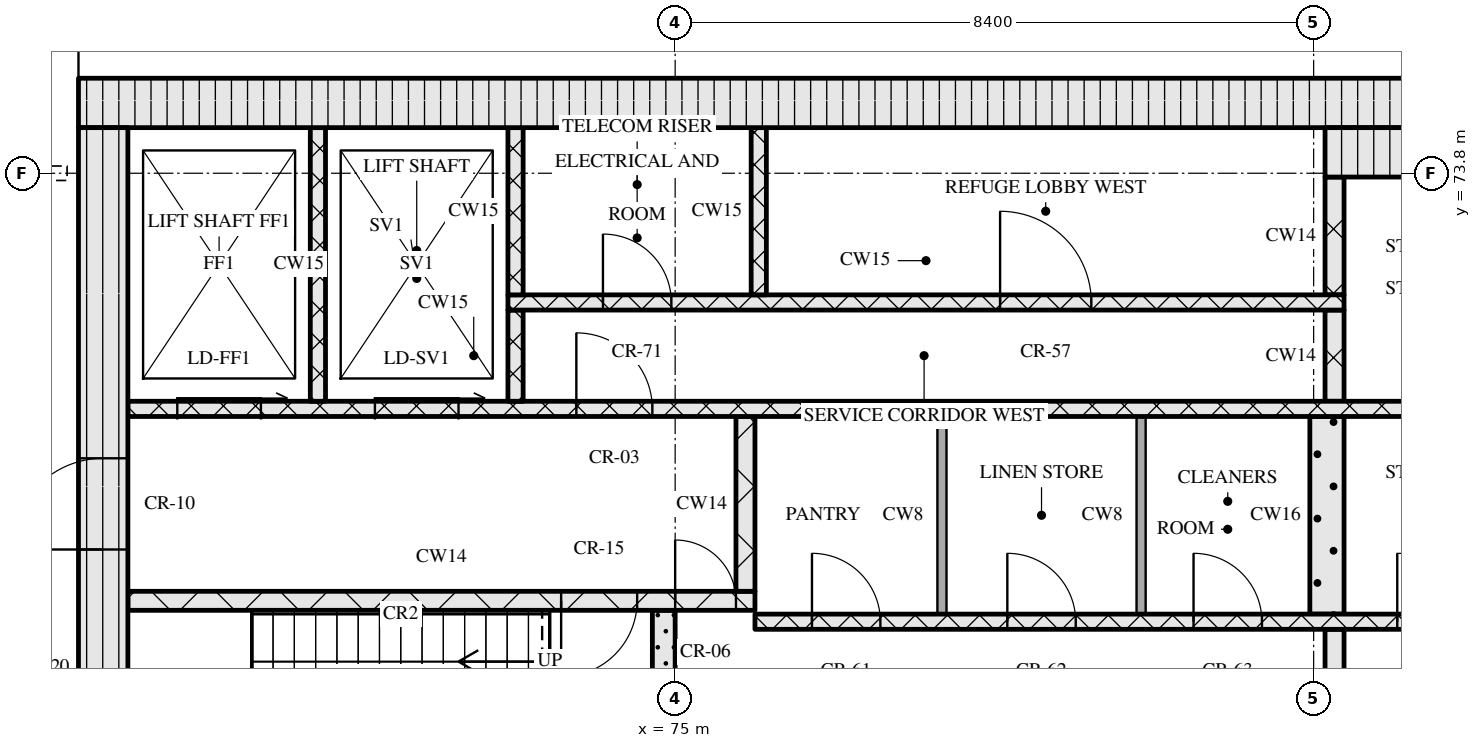
"""IFC4 building model, lengths in metres.
Left out: names, types, materials, properties, quantities, classifications, styles, units other than length and angle.
Written with IfcOpenShell. Run it as: python <this file> out.ifc"""

import sys

from ifc_helpers import new_model, si_unit, direction, frame, frame_2d, origin, place, context, subcontext, project, spatial, rectangle, extrude, element, fill, save


model = new_model("IFC4")
c1 = context("Model", 3, precision=1e-05, world=origin(), true_north=direction((0.0, 1.0)))
c2 = subcontext(c1, "Body", "Model", "MODEL_VIEW")
j1 = project(units=[si_unit("LENGTHUNIT", "METRE"), si_unit("PLANEANGLEUNIT", "RADIAN")], contexts=[c1])
p1 = place(None, origin())
s1 = spatial("IfcSite", under=j1, at=p1, CompositionType="ELEMENT")
p2 = place(p1, origin())
s2 = spatial("IfcBuilding", under=s1, at=p2, CompositionType="ELEMENT")
p3 = place(p2, frame((0.0, 0.0, 194.25)))
s3 = spatial("IfcBuildingStorey", under=s2, at=p3, CompositionType="ELEMENT", Elevation=194.25)
p4 = place(p3, frame((67.15, 74.725, 0.0), z_axis=(0.0, 0.0, 1.0), x_axis=(1.0, 0.0, 0.0)))
e1 = element("IfcWall", 1, at=p4, inside=s3, PredefinedType="SOLIDWALL", context=c2, shape_type="SweptSolid", body=[
    extrude(rectangle(XDim=40.9, YDim=0.65, at=frame_2d((20.45, 0.0))), origin(), (0.0, 0.0, 1.0), 10.97),
])
p5 = place(p3, frame((67.475, 62.4, 0.0), z_axis=(0.0, 0.0, 1.0), x_axis=(0.0, 1.0, 0.0)))
e2 = element("IfcWall", 2, at=p5, inside=s3, PredefinedType="SOLIDWALL", context=c2, shape_type="SweptSolid", body=[
    extrude(rectangle(XDim=12.0, YDim=0.65, at=frame_2d((6.0, 0.0))), origin(), (0.0, 0.0, 1.0), 10.97),
])
p6 = place(p5, frame((6.45, 0.0, 0.0)))
e3 = element("IfcOpeningElement", 3, at=p6, cuts=e2, PredefinedType="OPENING", context=c2, shape_type="SweptSolid", body=[
    extrude(rectangle(XDim=1.2, YDim=2.1, at=frame_2d((0.6, 1.05))), frame((0.0, 0.335, 0.0), z_axis=(0.0, -1.0, 0.0), x_axis=(1.0, 0.0, 0.0)), (0.0, 0.0, 1.0), 0.67),
])
p7 = place(p3, frame((74.85, 65.2, 0.0), z_axis=(0.0, 0.0, 1.0), x_axis=(0.0, 1.0, 0.0)))
e4 = element("IfcWall", 4, at=p7, inside=s3, PredefinedType="SOLIDWALL", context=c2, shape_type="SweptSolid", body=[
    extrude(rectangle(XDim=2.85, YDim=0.3, at=frame_2d((1.425, 0.0))), origin(), (0.0, 0.0, 1.0), 10.97),
])
p8 = place(p3, frame((83.675, 65.2, 0.0), z_axis=(0.0, 0.0, 1.0), x_axis=(0.0, 1.0, 0.0)))
e5 = element("IfcWall", 5, at=p8, inside=s3, PredefinedType="SOLIDWALL", context=c2, shape_type="SweptSolid", body=[
    extrude(rectangle(XDim=2.6, YDim=0.25, at=frame_2d((1.3, 0.0))), origin(), (0.0, 0.0, 1.0), 10.97),
])
p9 = place(p8, frame((0.7, 0.0, 0.0)))
e6 = element("IfcOpeningElement", 6, at=p9, cuts=e5, PredefinedType="OPENING", context=c2, shape_type="SweptSolid", body=[
    extrude(rectangle(XDim=1.2, YDim=2.1, at=frame_2d((0.6, 1.05))), frame((0.0, 0.135, 0.0), z_axis=(0.0, -1.0, 0.0), x_axis=(1.0, 0.0, 0.0)), (0.0, 0.0, 1.0), 0.27),
])
p10 = place(p3, frame((76.05, 67.9, 0.0), z_axis=(0.0, 0.0, 1.0), x_axis=(1.0, 0.0, 0.0)))
e7 = element("IfcWall", 7, at=p10, inside=s3, PredefinedType="SOLIDWALL", context=c2, shape_type="SweptSolid", body=[
    extrude(rectangle(XDim=23.1, YDim=0.2, at=frame_2d((11.55, 0.0))), origin(), (0.0, 0.0, 1.0), 10.97),
])
p11 = place(p10, frame((0.75, 0.0, 0.0)))
e8 = element("IfcOpeningElement", 8, at=p11, cuts=e7, PredefinedType="OPENING", context=c2, shape_type="SweptSolid", body=[
    extrude(rectangle(XDim=0.9, YDim=2.1, at=frame_2d((0.45, 1.05))), frame((0.0, 0.11, 0.0), z_axis=(0.0, -1.0, 0.0), x_axis=(1.0, 0.0, 0.0)), (0.0, 0.0, 1.0), 0.22),
])
p12 = place(p10, frame((3.32, 0.0, 0.0)))
e9 = element("IfcOpeningElement", 9, at=p12, cuts=e7, PredefinedType="OPENING", context=c2, shape_type="SweptSolid", body=[
    extrude(rectangle(XDim=0.9, YDim=2.1, at=frame_2d((0.45, 1.05))), frame((0.0, 0.11, 0.0), z_axis=(0.0, -1.0, 0.0), x_axis=(1.0, 0.0, 0.0)), (0.0, 0.0, 1.0), 0.22),
])
p13 = place(p10, frame((5.77, 0.0, 0.0)))
e10 = element("IfcOpeningElement", 10, at=p13, cuts=e7, PredefinedType="OPENING", context=c2, shape_type="SweptSolid", body=[
    extrude(rectangle(XDim=0.9, YDim=2.1, at=frame_2d((0.45, 1.05))), frame((0.0, 0.11, 0.0), z_axis=(0.0, -1.0, 0.0), x_axis=(1.0, 0.0, 0.0)), (0.0, 0.0, 1.0), 0.22),
])
p14 = place(p10, frame((8.45, 0.0, 0.0)))
e11 = element("IfcOpeningElement", 11, at=p14, cuts=e7, PredefinedType="OPENING", context=c2, shape_type="SweptSolid", body=[
    extrude(rectangle(XDim=0.9, YDim=2.1, at=frame_2d((0.45, 1.05))), frame((0.0, 0.11, 0.0), z_axis=(0.0, -1.0, 0.0), x_axis=(1.0, 0.0, 0.0)), (0.0, 0.0, 1.0), 0.22),
])
p15 = place(p10, frame((10.91, 0.0, 0.0)))
e12 = element("IfcOpeningElement", 12, at=p15, cuts=e7, PredefinedType="OPENING", context=c2, shape_type="SweptSolid", body=[
    extrude(rectangle(XDim=0.9, YDim=2.1, at=frame_2d((0.45, 1.05))), frame((0.0, 0.11, 0.0), z_axis=(0.0, -1.0, 0.0), x_axis=(1.0, 0.0, 0.0)), (0.0, 0.0, 1.0), 0.22),
])
p16 = place(p10, frame((13.55, 0.0, 0.0)))
e13 = element("IfcOpeningElement", 13, at=p16, cuts=e7, PredefinedType="OPENING", context=c2, shape_type="SweptSolid", body=[
    extrude(rectangle(XDim=1.0, YDim=2.1, at=frame_2d((0.5, 1.05))), frame((0.0, 0.11, 0.0), z_axis=(0.0, -1.0, 0.0), x_axis=(1.0, 0.0, 0.0)), (0.0, 0.0, 1.0), 0.22),
])
p17 = place(p10, frame((16.2, 0.0, 0.0)))
e14 = element("IfcOpeningElement", 14, at=p17, cuts=e7, PredefinedType="OPENING", context=c2, shape_type="SweptSolid", body=[
    extrude(rectangle(XDim=1.1, YDim=2.1, at=frame_2d((0.55, 1.05))), frame((0.0, 0.11, 0.0), z_axis=(0.0, -1.0, 0.0), x_axis=(1.0, 0.0, 0.0)), (0.0, 0.0, 1.0), 0.22),
])
p18 = place(p10, frame((18.7, 0.0, 0.0)))
e15 = element("IfcOpeningElement", 15, at=p18, cuts=e7, PredefinedType="OPENING", context=c2, shape_type="SweptSolid", body=[
    extrude(rectangle(XDim=1.1, YDim=2.1, at=frame_2d((0.55, 1.05))), frame((0.0, 0.11, 0.0), z_axis=(0.0, -1.0, 0.0), x_axis=(1.0, 0.0, 0.0)), (0.0, 0.0, 1.0), 0.22),
])
p19 = place(p10, frame((21.2, 0.0, 0.0)))
e16 = element("IfcOpeningElement", 16, at=p19, cuts=e7, PredefinedType="OPENING", context=c2, shape_type="SweptSolid", body=[
    extrude(rectangle(XDim=1.1, YDim=2.1, at=frame_2d((0.55, 1.05))), frame((0.0, 0.11, 0.0), z_axis=(0.0, -1.0, 0.0), x_axis=(1.0, 0.0, 0.0)), (0.0, 0.0, 1.0), 0.22),
])
for number, where, z_axis, x_axis in (
    (17, (78.51, 68.0, 0.0), (0.0, 0.0, 1.0), (0.0, 1.0, 0.0)),
    (18, (81.13, 68.0, 0.0), (0.0, 0.0, 1.0), (0.0, 1.0, 0.0)),
):
    element("IfcWall", number, at=place(p3, frame(where, z_axis=z_axis, x_axis=x_axis)), inside=s3, PredefinedType="PARTITIONING", context=c2, shape_type="SweptSolid", body=[
        extrude(rectangle(XDim=2.6, YDim=0.12, at=frame_2d((1.3, 0.0))), origin(), (0.0, 0.0, 1.0), 10.97),
    ])
p20 = place(p3, frame((83.575, 68.0, 0.0), z_axis=(0.0, 0.0, 1.0), x_axis=(0.0, 1.0, 0.0)))
e19 = element("IfcWall", 19, at=p20, inside=s3, PredefinedType="SOLIDWALL", context=c2, shape_type="SweptSolid", body=[
    extrude(rectangle(XDim=2.6, YDim=0.45, at=frame_2d((1.3, 0.0))), origin(), (0.0, 0.0, 1.0), 10.97),
])
p21 = place(p3, frame((67.8, 68.175, 0.0), z_axis=(0.0, 0.0, 1.0), x_axis=(1.0, 0.0, 0.0)))
e20 = element("IfcWall", 20, at=p21, inside=s3, PredefinedType="SOLIDWALL", context=c2, shape_type="SweptSolid", body=[
    extrude(rectangle(XDim=8.25, YDim=0.25, at=frame_2d((4.125, 0.0))), origin(), (0.0, 0.0, 1.0), 10.97),
])
p22 = place(p21, frame((5.7, 0.0, 0.0)))
e21 = element("IfcOpeningElement", 21, at=p22, cuts=e20, PredefinedType="OPENING", context=c2, shape_type="SweptSolid", body=[
    extrude(rectangle(XDim=1.0, YDim=2.1, at=frame_2d((0.5, 1.05))), frame((0.0, 0.135, 0.0), z_axis=(0.0, -1.0, 0.0), x_axis=(1.0, 0.0, 0.0)), (0.0, 0.0, 1.0), 0.27),
])
p23 = place(p21, frame((7.2, 0.0, 0.0)))
e22 = element("IfcOpeningElement", 22, at=p23, cuts=e20, PredefinedType="OPENING", context=c2, shape_type="SweptSolid", body=[
    extrude(rectangle(XDim=0.8, YDim=2.1, at=frame_2d((0.4, 1.05))), frame((0.0, 0.135, 0.0), z_axis=(0.0, -1.0, 0.0), x_axis=(1.0, 0.0, 0.0)), (0.0, 0.0, 1.0), 0.27),
])
p24 = place(p3, frame((75.925, 68.3, 0.0), z_axis=(0.0, 0.0, 1.0), x_axis=(0.0, 1.0, 0.0)))
e23 = element("IfcWall", 23, at=p24, inside=s3, PredefinedType="SOLIDWALL", context=c2, shape_type="SweptSolid", body=[
    extrude(rectangle(XDim=2.3, YDim=0.25, at=frame_2d((1.15, 0.0))), origin(), (0.0, 0.0, 1.0), 10.97),
])
p25 = place(p3, frame((67.8, 70.7, 0.0), z_axis=(0.0, 0.0, 1.0), x_axis=(1.0, 0.0, 0.0)))
e24 = element("IfcWall", 24, at=p25, inside=s3, PredefinedType="SOLIDWALL", context=c2, shape_type="SweptSolid", body=[
    extrude(rectangle(XDim=39.6, YDim=0.2, at=frame_2d((19.8, 0.0))), origin(), (0.0, 0.0, 1.0), 10.97),
])
p26 = place(p25, frame((0.65, 0.0, 0.0)))
e25 = element("IfcOpeningElement", 25, at=p26, cuts=e24, PredefinedType="OPENING", context=c2, shape_type="SweptSolid", body=[
    extrude(rectangle(XDim=1.1, YDim=2.1, at=frame_2d((0.55, 1.05))), frame((0.0, 0.11, 0.0), z_axis=(0.0, -1.0, 0.0), x_axis=(1.0, 0.0, 0.0)), (0.0, 0.0, 1.0), 0.22),
])
p27 = place(p25, frame((3.25, 0.0, 0.0)))
e26 = element("IfcOpeningElement", 26, at=p27, cuts=e24, PredefinedType="OPENING", context=c2, shape_type="SweptSolid", body=[
    extrude(rectangle(XDim=1.1, YDim=2.1, at=frame_2d((0.55, 1.05))), frame((0.0, 0.11, 0.0), z_axis=(0.0, -1.0, 0.0), x_axis=(1.0, 0.0, 0.0)), (0.0, 0.0, 1.0), 0.22),
])
p28 = place(p25, frame((5.9, 0.0, 0.0)))
e27 = element("IfcOpeningElement", 27, at=p28, cuts=e24, PredefinedType="OPENING", context=c2, shape_type="SweptSolid", body=[
    extrude(rectangle(XDim=1.0, YDim=2.1, at=frame_2d((0.5, 1.05))), frame((0.0, 0.11, 0.0), z_axis=(0.0, -1.0, 0.0), x_axis=(1.0, 0.0, 0.0)), (0.0, 0.0, 1.0), 0.22),
])
p29 = place(p25, frame((21.7, 0.0, 0.0)))
e28 = element("IfcOpeningElement", 28, at=p29, cuts=e24, PredefinedType="OPENING", context=c2, shape_type="SweptSolid", body=[
    extrude(rectangle(XDim=1.0, YDim=2.1, at=frame_2d((0.5, 1.05))), frame((0.0, 0.11, 0.0), z_axis=(0.0, -1.0, 0.0), x_axis=(1.0, 0.0, 0.0)), (0.0, 0.0, 1.0), 0.22),
])
p30 = place(p25, frame((32.7, 0.0, 0.0)))
e29 = element("IfcOpeningElement", 29, at=p30, cuts=e24, PredefinedType="OPENING", context=c2, shape_type="SweptSolid", body=[
    extrude(rectangle(XDim=1.0, YDim=2.1, at=frame_2d((0.5, 1.05))), frame((0.0, 0.11, 0.0), z_axis=(0.0, -1.0, 0.0), x_axis=(1.0, 0.0, 0.0)), (0.0, 0.0, 1.0), 0.22),
])
p31 = place(p25, frame((35.25, 0.0, 0.0)))
e30 = element("IfcOpeningElement", 30, at=p31, cuts=e24, PredefinedType="OPENING", context=c2, shape_type="SweptSolid", body=[
    extrude(rectangle(XDim=1.1, YDim=2.1, at=frame_2d((0.55, 1.05))), frame((0.0, 0.11, 0.0), z_axis=(0.0, -1.0, 0.0), x_axis=(1.0, 0.0, 0.0)), (0.0, 0.0, 1.0), 0.22),
])
p32 = place(p25, frame((37.85, 0.0, 0.0)))
e31 = element("IfcOpeningElement", 31, at=p32, cuts=e24, PredefinedType="OPENING", context=c2, shape_type="SweptSolid", body=[
    extrude(rectangle(XDim=1.1, YDim=2.1, at=frame_2d((0.55, 1.05))), frame((0.0, 0.11, 0.0), z_axis=(0.0, -1.0, 0.0), x_axis=(1.0, 0.0, 0.0)), (0.0, 0.0, 1.0), 0.22),
])
p33 = place(p3, frame((70.3, 70.8, 0.0), z_axis=(0.0, 0.0, 1.0), x_axis=(0.0, 1.0, 0.0)))
e32 = element("IfcWall", 32, at=p33, inside=s3, PredefinedType="SOLIDWALL", context=c2, shape_type="SweptSolid", body=[
    extrude(rectangle(XDim=3.6, YDim=0.2, at=frame_2d((1.8, 0.0))), origin(), (0.0, 0.0, 1.0), 10.97),
])
p34 = place(p3, frame((72.9, 70.8, 0.0), z_axis=(0.0, 0.0, 1.0), x_axis=(0.0, 1.0, 0.0)))
e33 = element("IfcWall", 33, at=p34, inside=s3, PredefinedType="SOLIDWALL", context=c2, shape_type="SweptSolid", body=[
    extrude(rectangle(XDim=1.2, YDim=0.2, at=frame_2d((0.6, 0.0))), origin(), (0.0, 0.0, 1.0), 10.97),
])
p35 = place(p3, frame((83.675, 70.8, 0.0), z_axis=(0.0, 0.0, 1.0), x_axis=(0.0, 1.0, 0.0)))
e34 = element("IfcWall", 34, at=p35, inside=s3, PredefinedType="SOLIDWALL", context=c2, shape_type="SweptSolid", body=[
    extrude(rectangle(XDim=1.2, YDim=0.25, at=frame_2d((0.6, 0.0))), origin(), (0.0, 0.0, 1.0), 10.97),
])
p36 = place(p3, frame((72.8, 72.1, 0.0), z_axis=(0.0, 0.0, 1.0), x_axis=(1.0, 0.0, 0.0)))
e35 = element("IfcWall", 35, at=p36, inside=s3, PredefinedType="SOLIDWALL", context=c2, shape_type="SweptSolid", body=[
    extrude(rectangle(XDim=11.0, YDim=0.2, at=frame_2d((5.5, 0.0))), origin(), (0.0, 0.0, 1.0), 10.97),
])
p37 = place(p36, frame((1.25, 0.0, 0.0)))
e36 = element("IfcOpeningElement", 36, at=p37, cuts=e35, PredefinedType="OPENING", context=c2, shape_type="SweptSolid", body=[
    extrude(rectangle(XDim=0.9, YDim=2.1, at=frame_2d((0.45, 1.05))), frame((0.0, 0.11, 0.0), z_axis=(0.0, -1.0, 0.0), x_axis=(1.0, 0.0, 0.0)), (0.0, 0.0, 1.0), 0.22),
])
p38 = place(p36, frame((6.475, 0.0, 0.0)))
e37 = element("IfcOpeningElement", 37, at=p38, cuts=e35, PredefinedType="OPENING", context=c2, shape_type="SweptSolid", body=[
    extrude(rectangle(XDim=1.2, YDim=2.1, at=frame_2d((0.6, 1.05))), frame((0.0, 0.11, 0.0), z_axis=(0.0, -1.0, 0.0), x_axis=(1.0, 0.0, 0.0)), (0.0, 0.0, 1.0), 0.22),
])
for number, where, z_axis, x_axis in (
    (38, (72.9, 72.2, 0.0), (0.0, 0.0, 1.0), (0.0, 1.0, 0.0)),
    (39, (76.1, 72.2, 0.0), (0.0, 0.0, 1.0), (0.0, 1.0, 0.0)),
):
    element("IfcWall", number, at=place(p3, frame(where, z_axis=z_axis, x_axis=x_axis)), inside=s3, PredefinedType="SOLIDWALL", context=c2, shape_type="SweptSolid", body=[
        extrude(rectangle(XDim=2.2, YDim=0.2, at=frame_2d((1.1, 0.0))), origin(), (0.0, 0.0, 1.0), 10.97),
    ])
p39 = place(p3, frame((83.675, 72.2, 0.0), z_axis=(0.0, 0.0, 1.0), x_axis=(0.0, 1.0, 0.0)))
e40 = element("IfcWall", 40, at=p39, inside=s3, PredefinedType="SOLIDWALL", context=c2, shape_type="SweptSolid", body=[
    extrude(rectangle(XDim=1.55, YDim=0.25, at=frame_2d((0.775, 0.0))), origin(), (0.0, 0.0, 1.0), 10.97),
])
p40 = place(p3, frame((83.55, 74.075, 0.0), z_axis=(0.0, 0.0, 1.0), x_axis=(1.0, 0.0, 0.0)))
e41 = element("IfcWall", 41, at=p40, inside=s3, PredefinedType="SOLIDWALL", context=c2, shape_type="SweptSolid", body=[
    extrude(rectangle(XDim=8.1, YDim=0.65, at=frame_2d((4.05, 0.0))), origin(), (0.0, 0.0, 1.0), 10.97),
])
p41 = place(p11, origin())
e42 = element("IfcDoor", 42, at=p41, inside=s3, OperationType="SINGLE_SWING_LEFT", PredefinedType="DOOR", context=c2, shape_type="SweptSolid", body=[
    extrude(rectangle(XDim=0.9, YDim=2.1, at=frame_2d((0.45, 1.05))), frame((0.0, 0.025, 0.0), z_axis=(0.0, -1.0, 0.0), x_axis=(1.0, 0.0, 0.0)), (0.0, 0.0, 1.0), 0.05),
])
fill(e8, e42)
p42 = place(p12, origin())
e43 = element("IfcDoor", 43, at=p42, inside=s3, OperationType="SINGLE_SWING_LEFT", PredefinedType="DOOR", context=c2, shape_type="SweptSolid", body=[
    extrude(rectangle(XDim=0.9, YDim=2.1, at=frame_2d((0.45, 1.05))), frame((0.0, 0.025, 0.0), z_axis=(0.0, -1.0, 0.0), x_axis=(1.0, 0.0, 0.0)), (0.0, 0.0, 1.0), 0.05),
])
fill(e9, e43)
p43 = place(p13, origin())
e44 = element("IfcDoor", 44, at=p43, inside=s3, OperationType="SINGLE_SWING_LEFT", PredefinedType="DOOR", context=c2, shape_type="SweptSolid", body=[
    extrude(rectangle(XDim=0.9, YDim=2.1, at=frame_2d((0.45, 1.05))), frame((0.0, 0.025, 0.0), z_axis=(0.0, -1.0, 0.0), x_axis=(1.0, 0.0, 0.0)), (0.0, 0.0, 1.0), 0.05),
])
fill(e10, e44)
p44 = place(p14, origin())
e45 = element("IfcDoor", 45, at=p44, inside=s3, OperationType="SINGLE_SWING_LEFT", PredefinedType="DOOR", context=c2, shape_type="SweptSolid", body=[
    extrude(rectangle(XDim=0.9, YDim=2.1, at=frame_2d((0.45, 1.05))), frame((0.0, 0.025, 0.0), z_axis=(0.0, -1.0, 0.0), x_axis=(1.0, 0.0, 0.0)), (0.0, 0.0, 1.0), 0.05),
])
fill(e11, e45)
p45 = place(p22, origin())
e46 = element("IfcDoor", 46, at=p45, inside=s3, OperationType="SINGLE_SWING_RIGHT", PredefinedType="DOOR", context=c2, shape_type="SweptSolid", body=[
    extrude(rectangle(XDim=1.0, YDim=2.1, at=frame_2d((0.5, 1.05))), frame((0.0, 0.025, 0.0), z_axis=(0.0, -1.0, 0.0), x_axis=(1.0, 0.0, 0.0)), (0.0, 0.0, 1.0), 0.05),
])
fill(e21, e46)
p46 = place(p23, origin())
e47 = element("IfcDoor", 47, at=p46, inside=s3, OperationType="SINGLE_SWING_LEFT", PredefinedType="DOOR", context=c2, shape_type="SweptSolid", body=[
    extrude(rectangle(XDim=0.8, YDim=2.1, at=frame_2d((0.4, 1.05))), frame((0.0, 0.025, 0.0), z_axis=(0.0, -1.0, 0.0), x_axis=(1.0, 0.0, 0.0)), (0.0, 0.0, 1.0), 0.05),
])
fill(e22, e47)
p47 = place(p6, origin())
e48 = element("IfcDoor", 48, at=p47, inside=s3, OperationType="SINGLE_SWING_LEFT", PredefinedType="DOOR", context=c2, shape_type="SweptSolid", body=[
    extrude(rectangle(XDim=1.2, YDim=2.1, at=frame_2d((0.6, 1.05))), frame((0.0, 0.025, 0.0), z_axis=(0.0, -1.0, 0.0), x_axis=(1.0, 0.0, 0.0)), (0.0, 0.0, 1.0), 0.05),
])
fill(e3, e48)
p48 = place(p26, origin())
e49 = element("IfcDoor", 49, at=p48, inside=s3, OperationType="SLIDING_TO_RIGHT", PredefinedType="DOOR", context=c2, shape_type="SweptSolid", body=[
    extrude(rectangle(XDim=1.1, YDim=2.1, at=frame_2d((0.55, 1.05))), frame((0.0, 0.025, 0.0), z_axis=(0.0, -1.0, 0.0), x_axis=(1.0, 0.0, 0.0)), (0.0, 0.0, 1.0), 0.05),
])
fill(e25, e49)
p49 = place(p27, origin())
e50 = element("IfcDoor", 50, at=p49, inside=s3, OperationType="SLIDING_TO_RIGHT", PredefinedType="DOOR", context=c2, shape_type="SweptSolid", body=[
    extrude(rectangle(XDim=1.1, YDim=2.1, at=frame_2d((0.55, 1.05))), frame((0.0, 0.025, 0.0), z_axis=(0.0, -1.0, 0.0), x_axis=(1.0, 0.0, 0.0)), (0.0, 0.0, 1.0), 0.05),
])
fill(e26, e50)
p50 = place(p28, origin())
e51 = element("IfcDoor", 51, at=p50, inside=s3, OperationType="SINGLE_SWING_LEFT", PredefinedType="DOOR", context=c2, shape_type="SweptSolid", body=[
    extrude(rectangle(XDim=1.0, YDim=2.1, at=frame_2d((0.5, 1.05))), frame((0.0, 0.025, 0.0), z_axis=(0.0, -1.0, 0.0), x_axis=(1.0, 0.0, 0.0)), (0.0, 0.0, 1.0), 0.05),
])
fill(e27, e51)
p51 = place(p37, origin())
e52 = element("IfcDoor", 52, at=p51, inside=s3, OperationType="SINGLE_SWING_LEFT", PredefinedType="DOOR", context=c2, shape_type="SweptSolid", body=[
    extrude(rectangle(XDim=0.9, YDim=2.1, at=frame_2d((0.45, 1.05))), frame((0.0, 0.025, 0.0), z_axis=(0.0, -1.0, 0.0), x_axis=(1.0, 0.0, 0.0)), (0.0, 0.0, 1.0), 0.05),
])
fill(e36, e52)
p52 = place(p38, origin())
e53 = element("IfcDoor", 53, at=p52, inside=s3, OperationType="SINGLE_SWING_LEFT", PredefinedType="DOOR", context=c2, shape_type="SweptSolid", body=[
    extrude(rectangle(XDim=1.2, YDim=2.1, at=frame_2d((0.6, 1.05))), frame((0.0, 0.025, 0.0), z_axis=(0.0, -1.0, 0.0), x_axis=(1.0, 0.0, 0.0)), (0.0, 0.0, 1.0), 0.05),
])
fill(e37, e53)
save(model, sys.argv[1])
